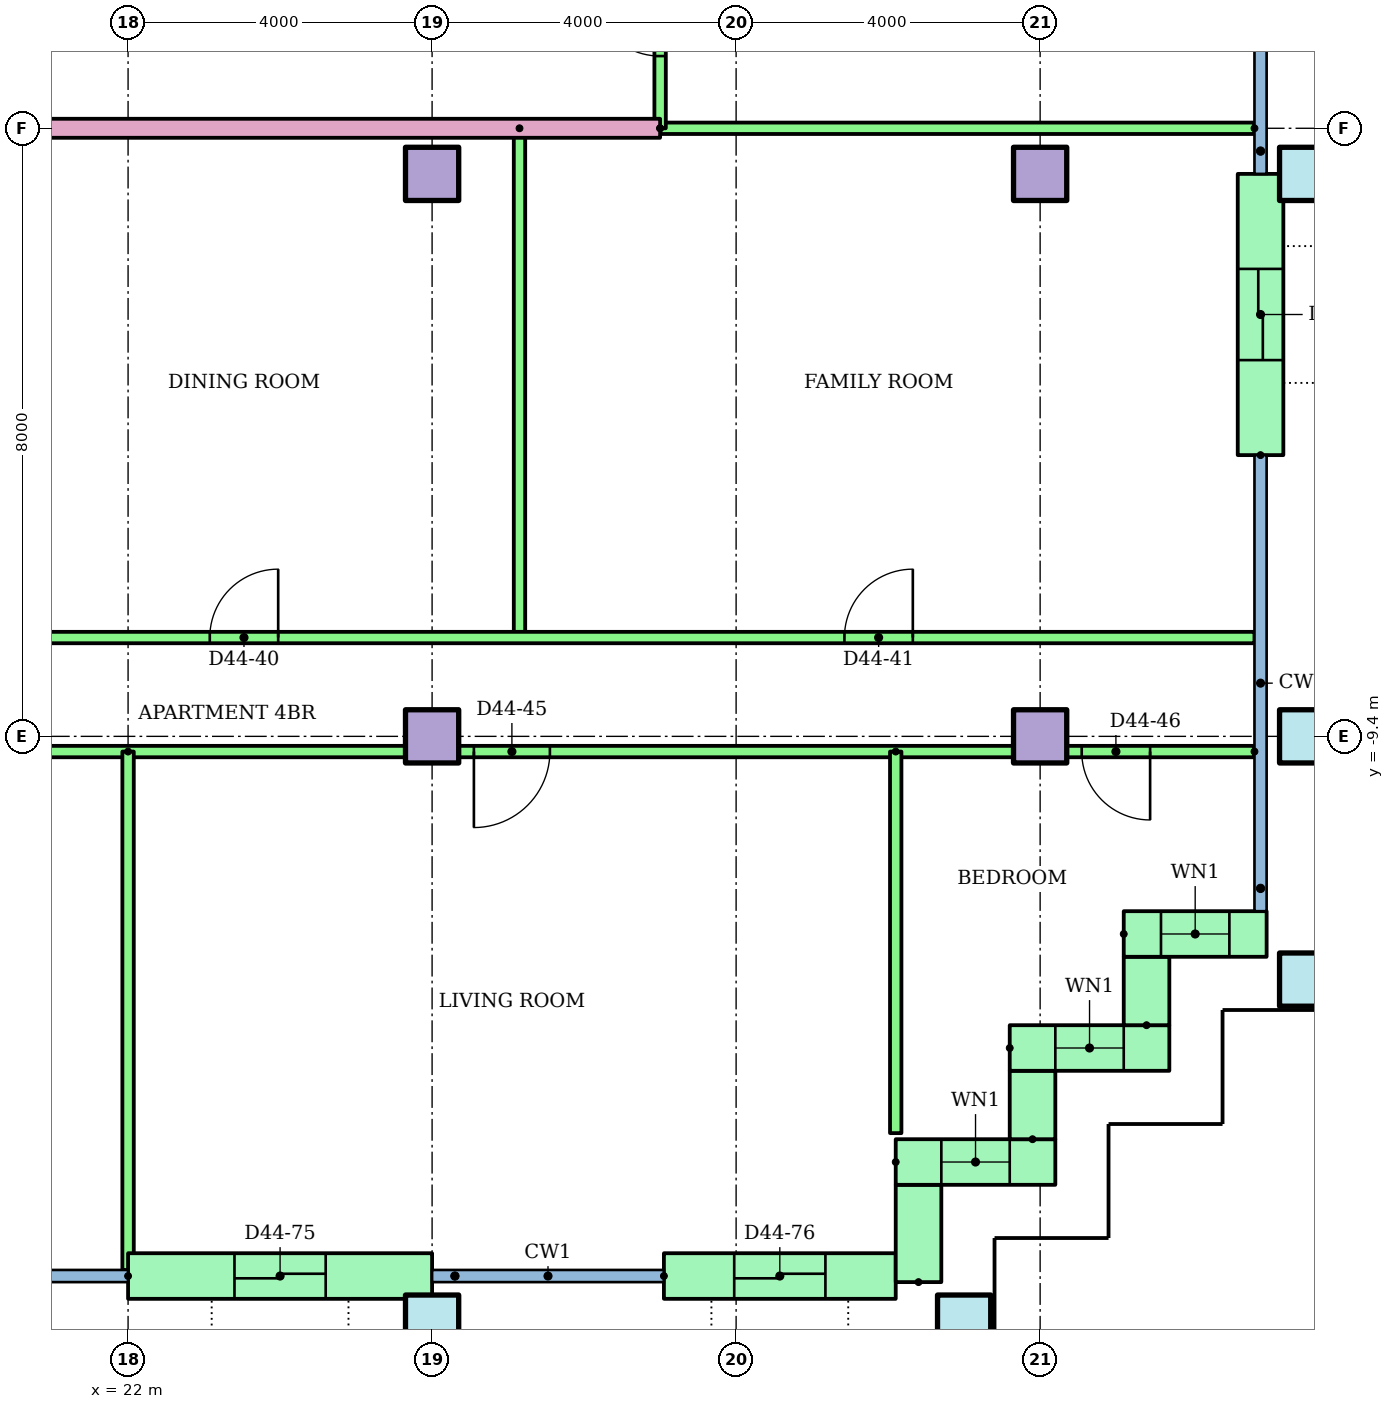
"""IFC4 building model, lengths in metres.
Left out: names, types, materials, properties, quantities, classifications, styles, units other than length and angle.
Written with IfcOpenShell. Run it as: python <this file> out.ifc"""

import sys

from ifc_helpers import new_model, si_unit, direction, frame, frame_2d, origin, origin_2d, place, context, subcontext, project, spatial, rectangle, hollow_rectangle, extrude, element, fill, save


model = new_model("IFC4")
c1 = context("Model", 3, precision=1e-05, world=origin(), true_north=direction((0.0, 1.0)))
c2 = subcontext(c1, "Body", "Model", "MODEL_VIEW")
j1 = project(units=[si_unit("LENGTHUNIT", "METRE"), si_unit("PLANEANGLEUNIT", "RADIAN")], contexts=[c1])
p1 = place(None, origin())
s1 = spatial("IfcSite", under=j1, at=p1, CompositionType="ELEMENT")
p2 = place(p1, origin())
s2 = spatial("IfcBuilding", under=s1, at=p2, CompositionType="ELEMENT")
p3 = place(p2, frame((0.0, 0.0, 171.7)))
s3 = spatial("IfcBuildingStorey", under=s2, at=p3, CompositionType="ELEMENT", Elevation=171.7)
for number, where in (
    (1, (26.0, -17.1, 0.0)),
    (2, (33.0, -17.1, 0.0)),
    (3, (37.5, -12.6, 0.0)),
):
    element("IfcColumn", number, at=place(p3, frame(where)), inside=s3, PredefinedType="COLUMN", context=c2, shape_type="SweptSolid", body=[
        extrude(hollow_rectangle(XDim=0.7, YDim=0.7, WallThickness=0.036, at=origin_2d()), origin(), (0.0, 0.0, 1.0), 3.2),
    ])
for number, where in (
    (4, (26.0, -9.4, 0.0)),
    (5, (34.0, -9.4, 0.0)),
):
    element("IfcColumn", number, at=place(p3, frame(where)), inside=s3, PredefinedType="COLUMN", context=c2, shape_type="SweptSolid", body=[
        extrude(rectangle(XDim=0.7, YDim=0.7, at=origin_2d()), origin(), (0.0, 0.0, 1.0), 3.2),
    ])
p4 = place(p3, frame((37.5, -9.4, 0.0)))
e6 = element("IfcColumn", 6, at=p4, inside=s3, PredefinedType="COLUMN", context=c2, shape_type="SweptSolid", body=[
    extrude(hollow_rectangle(XDim=0.7, YDim=0.7, WallThickness=0.036, at=origin_2d()), origin(), (0.0, 0.0, 1.0), 3.2),
])
for number, where in (
    (7, (26.0, -2.0, 0.0)),
    (8, (34.0, -2.0, 0.0)),
):
    element("IfcColumn", number, at=place(p3, frame(where)), inside=s3, PredefinedType="COLUMN", context=c2, shape_type="SweptSolid", body=[
        extrude(rectangle(XDim=0.7, YDim=0.7, at=origin_2d()), origin(), (0.0, 0.0, 1.0), 3.2),
    ])
p5 = place(p3, frame((37.5, -2.0, 0.0)))
e9 = element("IfcColumn", 9, at=p5, inside=s3, PredefinedType="COLUMN", context=c2, shape_type="SweptSolid", body=[
    extrude(hollow_rectangle(XDim=0.7, YDim=0.7, WallThickness=0.036, at=origin_2d()), origin(), (0.0, 0.0, 1.0), 3.2),
])
p6 = place(p3, frame((22.0, -16.5, 0.0)))
e10 = element("IfcWall", 10, at=p6, inside=s3, PredefinedType="STANDARD", context=c2, shape_type="SweptSolid", body=[
    extrude(rectangle(XDim=4.0, YDim=0.6, at=frame_2d((2.0, 0.0))), origin(), (0.0, 0.0, 1.0), 2.92),
])
p7 = place(p6, frame((1.4, 0.0, 0.0)))
e11 = element("IfcOpeningElement", 11, at=p7, cuts=e10, PredefinedType="OPENING", context=c2, shape_type="SweptSolid", body=[
    extrude(rectangle(XDim=1.2, YDim=2.1, at=frame_2d((0.6, 1.05))), frame((0.0, 0.31, 0.0), z_axis=(0.0, -1.0, 0.0), x_axis=(1.0, 0.0, 0.0)), (0.0, 0.0, 1.0), 0.62),
])
p8 = place(p3, frame((29.05, -16.5, 0.0)))
e12 = element("IfcWall", 12, at=p8, inside=s3, PredefinedType="STANDARD", context=c2, shape_type="SweptSolid", body=[
    extrude(rectangle(XDim=3.05, YDim=0.6, at=frame_2d((1.525, 0.0))), origin(), (0.0, 0.0, 1.0), 2.92),
])
p9 = place(p8, frame((0.925, 0.0, 0.0)))
e13 = element("IfcOpeningElement", 13, at=p9, cuts=e12, PredefinedType="OPENING", context=c2, shape_type="SweptSolid", body=[
    extrude(rectangle(XDim=1.2, YDim=2.1, at=frame_2d((0.6, 1.05))), frame((0.0, 0.31, 0.0), z_axis=(0.0, -1.0, 0.0), x_axis=(1.0, 0.0, 0.0)), (0.0, 0.0, 1.0), 0.62),
])
p10 = place(p3, frame((32.4, -16.58, 0.0), z_axis=(0.0, 0.0, 1.0), x_axis=(0.0, 1.0, 0.0)))
e14 = element("IfcWall", 14, at=p10, inside=s3, PredefinedType="STANDARD", context=c2, shape_type="SweptSolid", body=[
    extrude(rectangle(XDim=1.28, YDim=0.6, at=frame_2d((0.64, 0.0))), origin(), (0.0, 0.0, 1.0), 2.92),
])
p11 = place(p3, frame((32.1, -15.0, 0.0)))
e15 = element("IfcWall", 15, at=p11, inside=s3, PredefinedType="STANDARD", context=c2, shape_type="SweptSolid", body=[
    extrude(rectangle(XDim=2.1, YDim=0.6, at=frame_2d((1.05, 0.0))), origin(), (0.0, 0.0, 1.0), 2.92),
])
p12 = place(p11, frame((0.6, 0.0, 0.9)))
e16 = element("IfcOpeningElement", 16, at=p12, cuts=e15, PredefinedType="OPENING", context=c2, shape_type="SweptSolid", body=[
    extrude(rectangle(XDim=0.9, YDim=1.5, at=frame_2d((0.45, 0.75))), frame((0.0, 0.31, 0.0), z_axis=(0.0, -1.0, 0.0), x_axis=(1.0, 0.0, 0.0)), (0.0, 0.0, 1.0), 0.62),
])
p13 = place(p3, frame((33.9, -14.7, 0.0), z_axis=(0.0, 0.0, 1.0), x_axis=(0.0, 1.0, 0.0)))
e17 = element("IfcWall", 17, at=p13, inside=s3, PredefinedType="STANDARD", context=c2, shape_type="SweptSolid", body=[
    extrude(rectangle(XDim=0.9, YDim=0.6, at=frame_2d((0.45, 0.0))), origin(), (0.0, 0.0, 1.0), 2.92),
])
p14 = place(p3, frame((33.6, -13.5, 0.0)))
e18 = element("IfcWall", 18, at=p14, inside=s3, PredefinedType="STANDARD", context=c2, shape_type="SweptSolid", body=[
    extrude(rectangle(XDim=2.1, YDim=0.6, at=frame_2d((1.05, 0.0))), origin(), (0.0, 0.0, 1.0), 2.92),
])
p15 = place(p14, frame((0.6, 0.0, 0.9)))
e19 = element("IfcOpeningElement", 19, at=p15, cuts=e18, PredefinedType="OPENING", context=c2, shape_type="SweptSolid", body=[
    extrude(rectangle(XDim=0.9, YDim=1.5, at=frame_2d((0.45, 0.75))), frame((0.0, 0.31, 0.0), z_axis=(0.0, -1.0, 0.0), x_axis=(1.0, 0.0, 0.0)), (0.0, 0.0, 1.0), 0.62),
])
p16 = place(p3, frame((35.4, -13.2, 0.0), z_axis=(0.0, 0.0, 1.0), x_axis=(0.0, 1.0, 0.0)))
e20 = element("IfcWall", 20, at=p16, inside=s3, PredefinedType="STANDARD", context=c2, shape_type="SweptSolid", body=[
    extrude(rectangle(XDim=0.9, YDim=0.6, at=frame_2d((0.45, 0.0))), origin(), (0.0, 0.0, 1.0), 2.92),
])
p17 = place(p3, frame((35.1, -12.0, 0.0)))
e21 = element("IfcWall", 21, at=p17, inside=s3, PredefinedType="STANDARD", context=c2, shape_type="SweptSolid", body=[
    extrude(rectangle(XDim=1.88, YDim=0.6, at=frame_2d((0.94, 0.0))), origin(), (0.0, 0.0, 1.0), 2.92),
])
p18 = place(p17, frame((0.49, 0.0, 0.9)))
e22 = element("IfcOpeningElement", 22, at=p18, cuts=e21, PredefinedType="OPENING", context=c2, shape_type="SweptSolid", body=[
    extrude(rectangle(XDim=0.9, YDim=1.5, at=frame_2d((0.45, 0.75))), frame((0.0, 0.31, 0.0), z_axis=(0.0, -1.0, 0.0), x_axis=(1.0, 0.0, 0.0)), (0.0, 0.0, 1.0), 0.62),
])
p19 = place(p3, frame((36.9, -5.7, 0.0), z_axis=(0.0, 0.0, 1.0), x_axis=(0.0, 1.0, 0.0)))
e23 = element("IfcWall", 23, at=p19, inside=s3, PredefinedType="STANDARD", context=c2, shape_type="SweptSolid", body=[
    extrude(rectangle(XDim=3.7, YDim=0.6, at=frame_2d((1.85, 0.0))), origin(), (0.0, 0.0, 1.0), 2.92),
])
p20 = place(p19, frame((1.25, 0.0, 0.0)))
e24 = element("IfcOpeningElement", 24, at=p20, cuts=e23, PredefinedType="OPENING", context=c2, shape_type="SweptSolid", body=[
    extrude(rectangle(XDim=1.2, YDim=2.1, at=frame_2d((0.6, 1.05))), frame((0.0, 0.31, 0.0), z_axis=(0.0, -1.0, 0.0), x_axis=(1.0, 0.0, 0.0)), (0.0, 0.0, 1.0), 0.62),
])
p21 = place(p3, frame((27.15, -1.4, 0.0), z_axis=(0.0, 0.0, 1.0), x_axis=(0.0, -1.0, 0.0)))
e25 = element("IfcWall", 25, at=p21, inside=s3, PredefinedType="PARTITIONING", context=c2, shape_type="SweptSolid", body=[
    extrude(rectangle(XDim=6.7, YDim=0.15, at=frame_2d((3.35, 0.0))), origin(), (0.0, 0.0, 1.0), 2.4),
])
p22 = place(p3, frame((12.0, -8.1, 0.0)))
e26 = element("IfcWall", 26, at=p22, inside=s3, PredefinedType="PARTITIONING", context=c2, shape_type="SweptSolid", body=[
    extrude(rectangle(XDim=24.82, YDim=0.15, at=frame_2d((12.41, 0.0))), origin(), (0.0, 0.0, 1.0), 2.4),
])
p23 = place(p22, frame((4.553, 0.0, 0.0)))
e27 = element("IfcOpeningElement", 27, at=p23, cuts=e26, PredefinedType="OPENING", context=c2, shape_type="SweptSolid", body=[
    extrude(rectangle(XDim=0.9, YDim=2.1, at=frame_2d((0.45, 1.05))), frame((0.0, 0.085, 0.0), z_axis=(0.0, -1.0, 0.0), x_axis=(1.0, 0.0, 0.0)), (0.0, 0.0, 1.0), 0.17),
])
p24 = place(p22, frame((11.075, 0.0, 0.0)))
e28 = element("IfcOpeningElement", 28, at=p24, cuts=e26, PredefinedType="OPENING", context=c2, shape_type="SweptSolid", body=[
    extrude(rectangle(XDim=0.9, YDim=2.1, at=frame_2d((0.45, 1.05))), frame((0.0, 0.085, 0.0), z_axis=(0.0, -1.0, 0.0), x_axis=(1.0, 0.0, 0.0)), (0.0, 0.0, 1.0), 0.17),
])
p25 = place(p22, frame((19.425, 0.0, 0.0)))
e29 = element("IfcOpeningElement", 29, at=p25, cuts=e26, PredefinedType="OPENING", context=c2, shape_type="SweptSolid", body=[
    extrude(rectangle(XDim=0.9, YDim=2.1, at=frame_2d((0.45, 1.05))), frame((0.0, 0.085, 0.0), z_axis=(0.0, -1.0, 0.0), x_axis=(1.0, 0.0, 0.0)), (0.0, 0.0, 1.0), 0.17),
])
p26 = place(p3, frame((36.82, -9.6, 0.0), z_axis=(0.0, 0.0, 1.0), x_axis=(-1.0, 0.0, 0.0)))
e30 = element("IfcWall", 30, at=p26, inside=s3, PredefinedType="PARTITIONING", context=c2, shape_type="SweptSolid", body=[
    extrude(rectangle(XDim=26.82, YDim=0.15, at=frame_2d((13.41, 0.0))), origin(), (0.0, 0.0, 1.0), 2.4),
])
p27 = place(p26, frame((24.37, 0.0, 0.0)))
e31 = element("IfcOpeningElement", 31, at=p27, cuts=e30, PredefinedType="OPENING", context=c2, shape_type="SweptSolid", body=[
    extrude(rectangle(XDim=0.9, YDim=2.1, at=frame_2d((0.45, 1.05))), frame((0.0, 0.085, 0.0), z_axis=(0.0, -1.0, 0.0), x_axis=(1.0, 0.0, 0.0)), (0.0, 0.0, 1.0), 0.17),
])
p28 = place(p26, frame((20.37, 0.0, 0.0)))
e32 = element("IfcOpeningElement", 32, at=p28, cuts=e30, PredefinedType="OPENING", context=c2, shape_type="SweptSolid", body=[
    extrude(rectangle(XDim=0.9, YDim=2.1, at=frame_2d((0.45, 1.05))), frame((0.0, 0.085, 0.0), z_axis=(0.0, -1.0, 0.0), x_axis=(1.0, 0.0, 0.0)), (0.0, 0.0, 1.0), 0.17),
])
p29 = place(p26, frame((16.37, 0.0, 0.0)))
e33 = element("IfcOpeningElement", 33, at=p29, cuts=e30, PredefinedType="OPENING", context=c2, shape_type="SweptSolid", body=[
    extrude(rectangle(XDim=0.9, YDim=2.1, at=frame_2d((0.45, 1.05))), frame((0.0, 0.085, 0.0), z_axis=(0.0, -1.0, 0.0), x_axis=(1.0, 0.0, 0.0)), (0.0, 0.0, 1.0), 0.17),
])
p30 = place(p26, frame((9.27, 0.0, 0.0)))
e34 = element("IfcOpeningElement", 34, at=p30, cuts=e30, PredefinedType="OPENING", context=c2, shape_type="SweptSolid", body=[
    extrude(rectangle(XDim=1.0, YDim=2.1, at=frame_2d((0.5, 1.05))), frame((0.0, 0.085, 0.0), z_axis=(0.0, -1.0, 0.0), x_axis=(1.0, 0.0, 0.0)), (0.0, 0.0, 1.0), 0.17),
])
p31 = place(p26, frame((1.373, 0.0, 0.0)))
e35 = element("IfcOpeningElement", 35, at=p31, cuts=e30, PredefinedType="OPENING", context=c2, shape_type="SweptSolid", body=[
    extrude(rectangle(XDim=0.9, YDim=2.1, at=frame_2d((0.45, 1.05))), frame((0.0, 0.085, 0.0), z_axis=(0.0, -1.0, 0.0), x_axis=(1.0, 0.0, 0.0)), (0.0, 0.0, 1.0), 0.17),
])
p32 = place(p3, frame((22.0, -9.6, 0.0), z_axis=(0.0, 0.0, 1.0), x_axis=(0.0, -1.0, 0.0)))
e36 = element("IfcWall", 36, at=p32, inside=s3, PredefinedType="PARTITIONING", context=c2, shape_type="SweptSolid", body=[
    extrude(rectangle(XDim=6.821, YDim=0.15, at=frame_2d((3.41, 0.0))), origin(), (0.0, 0.0, 1.0), 2.4),
])
p33 = place(p3, frame((32.1, -9.6, 0.0), z_axis=(0.0, 0.0, 1.0), x_axis=(0.0, -1.0, 0.0)))
e37 = element("IfcWall", 37, at=p33, inside=s3, PredefinedType="PARTITIONING", context=c2, shape_type="SweptSolid", body=[
    extrude(rectangle(XDim=5.02, YDim=0.15, at=frame_2d((2.51, 0.0))), origin(), (0.0, 0.0, 1.0), 2.4),
])
p34 = place(p3, frame((29.0, -1.4, 0.0), z_axis=(0.0, 0.0, 1.0), x_axis=(-1.0, 0.0, 0.0)))
e38 = element("IfcWall", 38, at=p34, inside=s3, PredefinedType="PARTITIONING", context=c2, shape_type="SweptSolid", body=[
    extrude(rectangle(XDim=15.0, YDim=0.25, at=frame_2d((7.5, 0.0))), origin(), (0.0, 0.0, 1.0), 2.4),
])
p35 = place(p3, frame((36.82, -1.4, 0.0), z_axis=(0.0, 0.0, 1.0), x_axis=(-1.0, 0.0, 0.0)))
e39 = element("IfcWall", 39, at=p35, inside=s3, PredefinedType="PARTITIONING", context=c2, shape_type="SweptSolid", body=[
    extrude(rectangle(XDim=7.82, YDim=0.15, at=frame_2d((3.91, 0.0))), origin(), (0.0, 0.0, 1.0), 2.4),
])
p36 = place(p3, frame((29.0, -1.4, 0.0), z_axis=(0.0, 0.0, 1.0), x_axis=(0.0, 1.0, 0.0)))
e40 = element("IfcWall", 40, at=p36, inside=s3, PredefinedType="PARTITIONING", context=c2, shape_type="SweptSolid", body=[
    extrude(rectangle(XDim=2.8, YDim=0.15, at=frame_2d((1.4, 0.0))), origin(), (0.0, 0.0, 1.0), 2.4),
])
p37 = place(p36, frame((0.95, 0.0, 0.0)))
e41 = element("IfcOpeningElement", 41, at=p37, cuts=e40, PredefinedType="OPENING", context=c2, shape_type="SweptSolid", body=[
    extrude(rectangle(XDim=0.9, YDim=2.1, at=frame_2d((0.45, 1.05))), frame((0.0, 0.085, 0.0), z_axis=(0.0, -1.0, 0.0), x_axis=(1.0, 0.0, 0.0)), (0.0, 0.0, 1.0), 0.17),
])
p38 = place(p12, origin())
e42 = element("IfcWindow", 42, at=p38, inside=s3, PartitioningType="SINGLE_PANEL", PredefinedType="WINDOW", context=c2, shape_type="SweptSolid", body=[
    extrude(rectangle(XDim=0.9, YDim=1.5, at=frame_2d((0.45, 0.75))), frame((0.0, 0.03, 0.0), z_axis=(0.0, -1.0, 0.0), x_axis=(1.0, 0.0, 0.0)), (0.0, 0.0, 1.0), 0.06),
])
fill(e16, e42)
p39 = place(p15, origin())
e43 = element("IfcWindow", 43, at=p39, inside=s3, PartitioningType="SINGLE_PANEL", PredefinedType="WINDOW", context=c2, shape_type="SweptSolid", body=[
    extrude(rectangle(XDim=0.9, YDim=1.5, at=frame_2d((0.45, 0.75))), frame((0.0, 0.03, 0.0), z_axis=(0.0, -1.0, 0.0), x_axis=(1.0, 0.0, 0.0)), (0.0, 0.0, 1.0), 0.06),
])
fill(e19, e43)
p40 = place(p18, origin())
e44 = element("IfcWindow", 44, at=p40, inside=s3, PartitioningType="SINGLE_PANEL", PredefinedType="WINDOW", context=c2, shape_type="SweptSolid", body=[
    extrude(rectangle(XDim=0.9, YDim=1.5, at=frame_2d((0.45, 0.75))), frame((0.0, 0.03, 0.0), z_axis=(0.0, -1.0, 0.0), x_axis=(1.0, 0.0, 0.0)), (0.0, 0.0, 1.0), 0.06),
])
fill(e22, e44)
p41 = place(p24, origin())
e45 = element("IfcDoor", 45, at=p41, inside=s3, OperationType="SINGLE_SWING_RIGHT", PredefinedType="DOOR", context=c2, shape_type="SweptSolid", body=[
    extrude(rectangle(XDim=0.9, YDim=2.1, at=frame_2d((0.45, 1.05))), frame((0.0, 0.025, 0.0), z_axis=(0.0, -1.0, 0.0), x_axis=(1.0, 0.0, 0.0)), (0.0, 0.0, 1.0), 0.05),
])
fill(e28, e45)
p42 = place(p25, origin())
e46 = element("IfcDoor", 46, at=p42, inside=s3, OperationType="SINGLE_SWING_RIGHT", PredefinedType="DOOR", context=c2, shape_type="SweptSolid", body=[
    extrude(rectangle(XDim=0.9, YDim=2.1, at=frame_2d((0.45, 1.05))), frame((0.0, 0.025, 0.0), z_axis=(0.0, -1.0, 0.0), x_axis=(1.0, 0.0, 0.0)), (0.0, 0.0, 1.0), 0.05),
])
fill(e29, e46)
p43 = place(p30, origin())
e47 = element("IfcDoor", 47, at=p43, inside=s3, OperationType="SINGLE_SWING_RIGHT", PredefinedType="DOOR", context=c2, shape_type="SweptSolid", body=[
    extrude(rectangle(XDim=1.0, YDim=2.1, at=frame_2d((0.5, 1.05))), frame((0.0, 0.025, 0.0), z_axis=(0.0, -1.0, 0.0), x_axis=(1.0, 0.0, 0.0)), (0.0, 0.0, 1.0), 0.05),
])
fill(e34, e47)
p44 = place(p31, origin())
e48 = element("IfcDoor", 48, at=p44, inside=s3, OperationType="SINGLE_SWING_LEFT", PredefinedType="DOOR", context=c2, shape_type="SweptSolid", body=[
    extrude(rectangle(XDim=0.9, YDim=2.1, at=frame_2d((0.45, 1.05))), frame((0.0, 0.025, 0.0), z_axis=(0.0, -1.0, 0.0), x_axis=(1.0, 0.0, 0.0)), (0.0, 0.0, 1.0), 0.05),
])
fill(e35, e48)
p45 = place(p37, origin())
e49 = element("IfcDoor", 49, at=p45, inside=s3, OperationType="SINGLE_SWING_RIGHT", PredefinedType="DOOR", context=c2, shape_type="SweptSolid", body=[
    extrude(rectangle(XDim=0.9, YDim=2.1, at=frame_2d((0.45, 1.05))), frame((0.0, 0.025, 0.0), z_axis=(0.0, -1.0, 0.0), x_axis=(1.0, 0.0, 0.0)), (0.0, 0.0, 1.0), 0.05),
])
fill(e41, e49)
p46 = place(p7, origin())
e50 = element("IfcDoor", 50, at=p46, inside=s3, OperationType="SLIDING_TO_LEFT", PredefinedType="DOOR", context=c2, shape_type="SweptSolid", body=[
    extrude(rectangle(XDim=1.2, YDim=2.1, at=frame_2d((0.6, 1.05))), frame((0.0, 0.025, 0.0), z_axis=(0.0, -1.0, 0.0), x_axis=(1.0, 0.0, 0.0)), (0.0, 0.0, 1.0), 0.05),
])
fill(e11, e50)
p47 = place(p9, origin())
e51 = element("IfcDoor", 51, at=p47, inside=s3, OperationType="SLIDING_TO_LEFT", PredefinedType="DOOR", context=c2, shape_type="SweptSolid", body=[
    extrude(rectangle(XDim=1.2, YDim=2.1, at=frame_2d((0.6, 1.05))), frame((0.0, 0.025, 0.0), z_axis=(0.0, -1.0, 0.0), x_axis=(1.0, 0.0, 0.0)), (0.0, 0.0, 1.0), 0.05),
])
fill(e13, e51)
p48 = place(p20, origin())
e52 = element("IfcDoor", 52, at=p48, inside=s3, OperationType="SLIDING_TO_LEFT", PredefinedType="DOOR", context=c2, shape_type="SweptSolid", body=[
    extrude(rectangle(XDim=1.2, YDim=2.1, at=frame_2d((0.6, 1.05))), frame((0.0, 0.025, 0.0), z_axis=(0.0, -1.0, 0.0), x_axis=(1.0, 0.0, 0.0)), (0.0, 0.0, 1.0), 0.05),
])
fill(e24, e52)
save(model, sys.argv[1])
